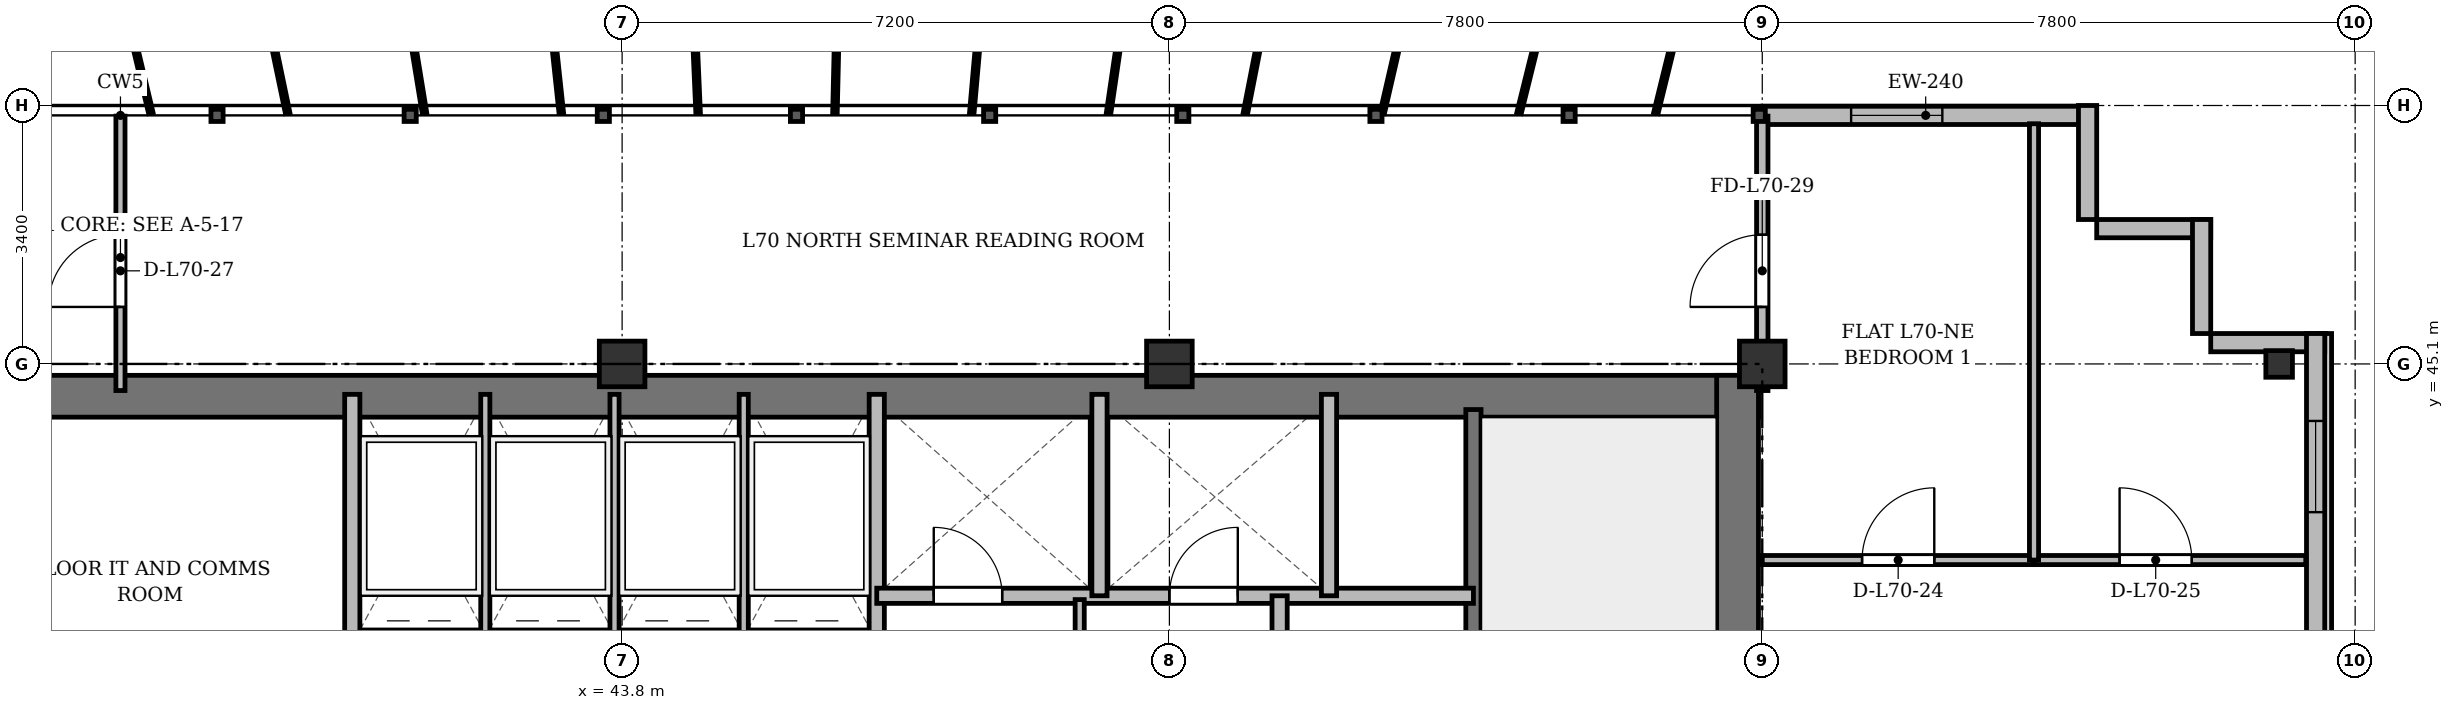
"""IFC4 building model, lengths in metres.
Left out: names, types, materials, properties, quantities, classifications, styles, units other than length and angle.
Written with IfcOpenShell. Run it as: python <this file> out.ifc"""

import sys

from ifc_helpers import new_model, si_unit, direction, frame, frame_2d, origin, origin_2d, place, context, subcontext, project, spatial, rectangle, i_section, extrude, source, transform, mapped, element, fill, save


model = new_model("IFC4")
c1 = context("Model", 3, precision=1e-05, world=origin(), true_north=direction((0.0, 1.0)))
c2 = subcontext(c1, "Body", "Model", "MODEL_VIEW")
j1 = project(units=[si_unit("LENGTHUNIT", "METRE"), si_unit("PLANEANGLEUNIT", "RADIAN")], contexts=[c1])
p1 = place(None, origin())
s1 = spatial("IfcSite", under=j1, at=p1, CompositionType="ELEMENT")
p2 = place(p1, origin())
s2 = spatial("IfcBuilding", under=s1, at=p2, CompositionType="ELEMENT")
p3 = place(p2, frame((0.0, 0.0, 270.3)))
s3 = spatial("IfcBuildingStorey", under=s2, at=p3, CompositionType="ELEMENT", Elevation=270.3)
m1 = source(origin(), c2, "Body", "SweptSolid", [
    extrude(rectangle(XDim=0.6, YDim=0.6, at=origin_2d()), origin(), (0.0, 0.0, 1.0), 3.6),
])
for number, where, z_axis, x_axis in (
    (1, (43.8, 45.1, 0.0), (0.0, 0.0, 1.0), (1.0, 0.0, 0.0)),
    (2, (51.0, 45.1, 0.0), (0.0, 0.0, 1.0), (1.0, 0.0, 0.0)),
    (3, (58.8, 45.1, 0.0), (0.0, 0.0, 1.0), (1.0, 0.0, 0.0)),
):
    element("IfcColumn", number, at=place(p3, frame(where, z_axis=z_axis, x_axis=x_axis)), inside=s3, PredefinedType="COLUMN", context=c2, shape_type="MappedRepresentation", body=[
        mapped(m1, transform((0.0, 0.0, 0.0), x_axis=(1.0, 0.0, 0.0), y_axis=(0.0, 1.0, 0.0), z_axis=(0.0, 0.0, 1.0), scale=1.0)),
    ])
m2 = source(origin(), c2, "Body", "SweptSolid", [
    extrude(i_section(OverallWidth=0.35, OverallDepth=0.35, WebThickness=0.018, FlangeThickness=0.028, at=origin_2d()), origin(), (0.0, 0.0, 1.0), 3.6),
])
p4 = place(p3, frame((65.6, 45.1, 0.0), z_axis=(0.0, 0.0, 1.0), x_axis=(1.0, 0.0, 0.0)))
e4 = element("IfcColumn", 4, at=p4, inside=s3, PredefinedType="COLUMN", context=c2, shape_type="MappedRepresentation", body=[
    mapped(m2, transform((0.0, 0.0, 0.0), x_axis=(1.0, 0.0, 0.0), y_axis=(0.0, 1.0, 0.0), z_axis=(0.0, 0.0, 1.0), scale=1.0)),
])
p5 = place(p3, frame((58.8, 48.37, 0.0), z_axis=(0.0, 0.0, 1.0), x_axis=(1.0, 0.0, 0.0)))
e5 = element("IfcWall", 5, at=p5, inside=s3, PredefinedType="SOLIDWALL", context=c2, shape_type="SweptSolid", body=[
    extrude(rectangle(XDim=4.3, YDim=0.24, at=frame_2d((2.15, 0.0))), origin(), (0.0, 0.0, 1.0), 3.37),
])
p6 = place(p5, frame((1.169, 0.0, 0.9)))
e6 = element("IfcOpeningElement", 6, at=p6, cuts=e5, PredefinedType="OPENING", context=c2, shape_type="SweptSolid", body=[
    extrude(rectangle(XDim=1.2, YDim=1.65, at=frame_2d((0.6, 0.825))), frame((0.0, 0.13, 0.0), z_axis=(0.0, -1.0, 0.0), x_axis=(1.0, 0.0, 0.0)), (0.0, 0.0, 1.0), 0.26),
])
for number, where, z_axis, x_axis in (
    (7, (63.08, 48.5, 0.0), (0.0, 0.0, 1.0), (0.0, -1.0, 0.0)),
    (8, (63.2, 46.88, 0.0), (0.0, 0.0, 1.0), (1.0, 0.0, 0.0)),
    (9, (64.58, 47.0, 0.0), (0.0, 0.0, 1.0), (0.0, -1.0, 0.0)),
    (10, (64.7, 45.38, 0.0), (0.0, 0.0, 1.0), (1.0, 0.0, 0.0)),
):
    element("IfcWall", number, at=place(p3, frame(where, z_axis=z_axis, x_axis=x_axis)), inside=s3, PredefinedType="SOLIDWALL", context=c2, shape_type="SweptSolid", body=[
        extrude(rectangle(XDim=1.5, YDim=0.24, at=frame_2d((0.75, 0.0))), origin(), (0.0, 0.0, 1.0), 3.37),
    ])
p7 = place(p3, frame((66.08, 45.5, 0.0), z_axis=(0.0, 0.0, 1.0), x_axis=(0.0, -1.0, 0.0)))
e11 = element("IfcWall", 11, at=p7, inside=s3, PredefinedType="SOLIDWALL", context=c2, shape_type="SweptSolid", body=[
    extrude(rectangle(XDim=39.0, YDim=0.24, at=frame_2d((19.5, 0.0))), origin(), (0.0, 0.0, 1.0), 3.37),
])
p8 = place(p7, frame((36.35, 0.0, 0.92)))
e12 = element("IfcOpeningElement", 12, at=p8, cuts=e11, PredefinedType="OPENING", context=c2, shape_type="SweptSolid", body=[
    extrude(rectangle(XDim=1.2, YDim=1.65, at=frame_2d((0.6, 0.825))), frame((0.0, 0.13, 0.0), z_axis=(0.0, -1.0, 0.0), x_axis=(1.0, 0.0, 0.0)), (0.0, 0.0, 1.0), 0.26),
])
p9 = place(p7, frame((32.8, 0.0, 0.92)))
e13 = element("IfcOpeningElement", 13, at=p9, cuts=e11, PredefinedType="OPENING", context=c2, shape_type="SweptSolid", body=[
    extrude(rectangle(XDim=2.6, YDim=1.9, at=frame_2d((1.3, 0.95))), frame((0.0, 0.13, 0.0), z_axis=(0.0, -1.0, 0.0), x_axis=(1.0, 0.0, 0.0)), (0.0, 0.0, 1.0), 0.26),
])
p10 = place(p7, frame((28.6, 0.0, 0.92)))
e14 = element("IfcOpeningElement", 14, at=p10, cuts=e11, PredefinedType="OPENING", context=c2, shape_type="SweptSolid", body=[
    extrude(rectangle(XDim=2.6, YDim=1.9, at=frame_2d((1.3, 0.95))), frame((0.0, 0.13, 0.0), z_axis=(0.0, -1.0, 0.0), x_axis=(1.0, 0.0, 0.0)), (0.0, 0.0, 1.0), 0.26),
])
p11 = place(p7, frame((21.4, 0.0, 0.92)))
e15 = element("IfcOpeningElement", 15, at=p11, cuts=e11, PredefinedType="OPENING", context=c2, shape_type="SweptSolid", body=[
    extrude(rectangle(XDim=2.6, YDim=1.9, at=frame_2d((1.3, 0.95))), frame((0.0, 0.13, 0.0), z_axis=(0.0, -1.0, 0.0), x_axis=(1.0, 0.0, 0.0)), (0.0, 0.0, 1.0), 0.26),
])
p12 = place(p7, frame((7.4, 0.0, 0.92)))
e16 = element("IfcOpeningElement", 16, at=p12, cuts=e11, PredefinedType="OPENING", context=c2, shape_type="SweptSolid", body=[
    extrude(rectangle(XDim=2.6, YDim=1.9, at=frame_2d((1.3, 0.95))), frame((0.0, 0.13, 0.0), z_axis=(0.0, -1.0, 0.0), x_axis=(1.0, 0.0, 0.0)), (0.0, 0.0, 1.0), 0.26),
])
p13 = place(p7, frame((4.5, 0.0, 0.92)))
e17 = element("IfcOpeningElement", 17, at=p13, cuts=e11, PredefinedType="OPENING", context=c2, shape_type="SweptSolid", body=[
    extrude(rectangle(XDim=1.2, YDim=1.65, at=frame_2d((0.6, 0.825))), frame((0.0, 0.13, 0.0), z_axis=(0.0, -1.0, 0.0), x_axis=(1.0, 0.0, 0.0)), (0.0, 0.0, 1.0), 0.26),
])
p14 = place(p7, frame((1.15, 0.0, 0.92)))
e18 = element("IfcOpeningElement", 18, at=p14, cuts=e11, PredefinedType="OPENING", context=c2, shape_type="SweptSolid", body=[
    extrude(rectangle(XDim=1.2, YDim=1.65, at=frame_2d((0.6, 0.825))), frame((0.0, 0.13, 0.0), z_axis=(0.0, -1.0, 0.0), x_axis=(1.0, 0.0, 0.0)), (0.0, 0.0, 1.0), 0.26),
])
p15 = place(p3, frame((15.65, 44.675, 0.0), z_axis=(0.0, 0.0, 1.0), x_axis=(1.0, 0.0, 0.0)))
e19 = element("IfcWall", 19, at=p15, inside=s3, PredefinedType="SHEAR", context=c2, shape_type="SweptSolid", body=[
    extrude(rectangle(XDim=43.1, YDim=0.55, at=frame_2d((21.55, 0.0))), origin(), (0.0, 0.0, 1.0), 3.37),
])
p16 = place(p3, frame((58.475, 33.4, 0.0), z_axis=(0.0, 0.0, 1.0), x_axis=(0.0, 1.0, 0.0)))
e20 = element("IfcWall", 20, at=p16, inside=s3, PredefinedType="SHEAR", context=c2, shape_type="SweptSolid", body=[
    extrude(rectangle(XDim=11.55, YDim=0.55, at=frame_2d((5.775, 0.0))), origin(), (0.0, 0.0, 1.0), 3.37),
])
p17 = place(p3, frame((55.0, 33.4, 0.0), z_axis=(0.0, 0.0, 1.0), x_axis=(0.0, 1.0, 0.0)))
e21 = element("IfcWall", 21, at=p17, inside=s3, PredefinedType="SHEAR", context=c2, shape_type="SweptSolid", body=[
    extrude(rectangle(XDim=11.1, YDim=0.2, at=frame_2d((5.55, 0.0))), origin(), (0.0, 0.0, 1.0), 3.37),
])
p18 = place(p17, frame((0.85, 0.0, 0.0)))
e22 = element("IfcOpeningElement", 22, at=p18, cuts=e21, PredefinedType="OPENING", context=c2, shape_type="SweptSolid", body=[
    extrude(rectangle(XDim=1.1, YDim=2.15, at=frame_2d((0.55, 1.075))), frame((0.0, 0.11, 0.0), z_axis=(0.0, -1.0, 0.0), x_axis=(1.0, 0.0, 0.0)), (0.0, 0.0, 1.0), 0.22),
])
p19 = place(p3, frame((40.25, 41.5, 0.0), z_axis=(0.0, 0.0, 1.0), x_axis=(0.0, 1.0, 0.0)))
e23 = element("IfcWall", 23, at=p19, inside=s3, PredefinedType="SOLIDWALL", context=c2, shape_type="SweptSolid", body=[
    extrude(rectangle(XDim=3.2, YDim=0.2, at=frame_2d((1.6, 0.0))), origin(), (0.0, 0.0, 1.0), 3.37),
])
for number, where, z_axis, x_axis in (
    (24, (42.0, 41.5, 0.0), (0.0, 0.0, 1.0), (0.0, 1.0, 0.0)),
    (25, (43.7, 41.5, 0.0), (0.0, 0.0, 1.0), (0.0, 1.0, 0.0)),
    (26, (45.4, 41.5, 0.0), (0.0, 0.0, 1.0), (0.0, 1.0, 0.0)),
):
    element("IfcWall", number, at=place(p3, frame(where, z_axis=z_axis, x_axis=x_axis)), inside=s3, PredefinedType="PARTITIONING", context=c2, shape_type="SweptSolid", body=[
        extrude(rectangle(XDim=3.2, YDim=0.12, at=frame_2d((1.6, 0.0))), origin(), (0.0, 0.0, 1.0), 3.37),
    ])
p20 = place(p3, frame((47.15, 33.4, 0.0), z_axis=(0.0, 0.0, 1.0), x_axis=(0.0, 1.0, 0.0)))
e27 = element("IfcWall", 27, at=p20, inside=s3, PredefinedType="SOLIDWALL", context=c2, shape_type="SweptSolid", body=[
    extrude(rectangle(XDim=11.3, YDim=0.2, at=frame_2d((5.65, 0.0))), origin(), (0.0, 0.0, 1.0), 2.92),
])
p21 = place(p3, frame((47.15, 42.05, 0.0), z_axis=(0.0, 0.0, 1.0), x_axis=(1.0, 0.0, 0.0)))
e28 = element("IfcWall", 28, at=p21, inside=s3, PredefinedType="SOLIDWALL", context=c2, shape_type="SweptSolid", body=[
    extrude(rectangle(XDim=7.85, YDim=0.2, at=frame_2d((3.925, 0.0))), origin(), (0.0, 0.0, 1.0), 2.87),
])
p22 = place(p21, frame((0.75, 0.0, 0.0)))
e29 = element("IfcOpeningElement", 29, at=p22, cuts=e28, PredefinedType="OPENING", context=c2, shape_type="SweptSolid", body=[
    extrude(rectangle(XDim=0.9, YDim=2.1, at=frame_2d((0.45, 1.05))), frame((0.0, 0.11, 0.0), z_axis=(0.0, -1.0, 0.0), x_axis=(1.0, 0.0, 0.0)), (0.0, 0.0, 1.0), 0.22),
])
p23 = place(p21, frame((3.85, 0.0, 0.0)))
e30 = element("IfcOpeningElement", 30, at=p23, cuts=e28, PredefinedType="OPENING", context=c2, shape_type="SweptSolid", body=[
    extrude(rectangle(XDim=0.9, YDim=2.1, at=frame_2d((0.45, 1.05))), frame((0.0, 0.11, 0.0), z_axis=(0.0, -1.0, 0.0), x_axis=(1.0, 0.0, 0.0)), (0.0, 0.0, 1.0), 0.22),
])
for number, where, z_axis, x_axis in (
    (31, (50.08, 42.05, 0.0), (0.0, 0.0, 1.0), (0.0, 1.0, 0.0)),
    (32, (53.1, 42.05, 0.0), (0.0, 0.0, 1.0), (0.0, 1.0, 0.0)),
):
    element("IfcWall", number, at=place(p3, frame(where, z_axis=z_axis, x_axis=x_axis)), inside=s3, PredefinedType="SOLIDWALL", context=c2, shape_type="SweptSolid", body=[
        extrude(rectangle(XDim=2.65, YDim=0.2, at=frame_2d((1.325, 0.0))), origin(), (0.0, 0.0, 1.0), 3.37),
    ])
p24 = place(p3, frame((52.45, 33.4, 0.0), z_axis=(0.0, 0.0, 1.0), x_axis=(0.0, 1.0, 0.0)))
e33 = element("IfcWall", 33, at=p24, inside=s3, PredefinedType="PARTITIONING", context=c2, shape_type="SweptSolid", body=[
    extrude(rectangle(XDim=8.65, YDim=0.2, at=frame_2d((4.325, 0.0))), origin(), (0.0, 0.0, 1.0), 2.92),
])
p25 = place(p24, frame((6.2, 0.0, 0.0)))
e34 = element("IfcOpeningElement", 34, at=p25, cuts=e33, PredefinedType="OPENING", context=c2, shape_type="SweptSolid", body=[
    extrude(rectangle(XDim=0.95, YDim=2.15, at=frame_2d((0.475, 1.075))), frame((0.0, 0.11, 0.0), z_axis=(0.0, -1.0, 0.0), x_axis=(1.0, 0.0, 0.0)), (0.0, 0.0, 1.0), 0.22),
])
p26 = place(p3, frame((49.82, 36.18, 0.0), z_axis=(0.0, 0.0, 1.0), x_axis=(0.0, 1.0, 0.0)))
e35 = element("IfcWall", 35, at=p26, inside=s3, PredefinedType="PARTITIONING", context=c2, shape_type="SweptSolid", body=[
    extrude(rectangle(XDim=5.82, YDim=0.12, at=frame_2d((2.91, 0.0))), origin(), (0.0, 0.0, 1.0), 3.37),
])
p27 = place(p3, frame((58.8, 42.52, 0.0), z_axis=(0.0, 0.0, 1.0), x_axis=(1.0, 0.0, 0.0)))
e36 = element("IfcWall", 36, at=p27, inside=s3, PredefinedType="PARTITIONING", context=c2, shape_type="SweptSolid", body=[
    extrude(rectangle(XDim=3.575, YDim=0.12, at=frame_2d((1.788, 0.0))), origin(), (0.0, 0.0, 1.0), 2.87),
])
p28 = place(p27, frame((1.313, 0.0, 0.0)))
e37 = element("IfcOpeningElement", 37, at=p28, cuts=e36, PredefinedType="OPENING", context=c2, shape_type="SweptSolid", body=[
    extrude(rectangle(XDim=0.95, YDim=2.15, at=frame_2d((0.475, 1.075))), frame((0.0, 0.07, 0.0), z_axis=(0.0, -1.0, 0.0), x_axis=(1.0, 0.0, 0.0)), (0.0, 0.0, 1.0), 0.14),
])
p29 = place(p3, frame((62.375, 42.52, 0.0), z_axis=(0.0, 0.0, 1.0), x_axis=(1.0, 0.0, 0.0)))
e38 = element("IfcWall", 38, at=p29, inside=s3, PredefinedType="PARTITIONING", context=c2, shape_type="SweptSolid", body=[
    extrude(rectangle(XDim=3.575, YDim=0.12, at=frame_2d((1.788, 0.0))), origin(), (0.0, 0.0, 1.0), 2.87),
])
p30 = place(p29, frame((1.126, 0.0, 0.0)))
e39 = element("IfcOpeningElement", 39, at=p30, cuts=e38, PredefinedType="OPENING", context=c2, shape_type="SweptSolid", body=[
    extrude(rectangle(XDim=0.95, YDim=2.15, at=frame_2d((0.475, 1.075))), frame((0.0, 0.07, 0.0), z_axis=(0.0, -1.0, 0.0), x_axis=(1.0, 0.0, 0.0)), (0.0, 0.0, 1.0), 0.14),
])
p31 = place(p3, frame((62.375, 42.52, 0.0), z_axis=(0.0, 0.0, 1.0), x_axis=(0.0, 1.0, 0.0)))
e40 = element("IfcWall", 40, at=p31, inside=s3, PredefinedType="PARTITIONING", context=c2, shape_type="SweptSolid", body=[
    extrude(rectangle(XDim=5.74, YDim=0.12, at=frame_2d((2.87, 0.0))), origin(), (0.0, 0.0, 1.0), 2.92),
])
p32 = place(p3, frame((37.2, 44.75, 0.0), z_axis=(0.0, 0.0, 1.0), x_axis=(0.0, 1.0, 0.0)))
e41 = element("IfcWall", 41, at=p32, inside=s3, PredefinedType="PARTITIONING", context=c2, shape_type="SweptSolid", body=[
    extrude(rectangle(XDim=3.61, YDim=0.12, at=frame_2d((1.805, 0.0))), origin(), (0.0, 0.0, 1.0), 2.92),
])
p33 = place(p32, frame((1.1, 0.0, 0.0)))
e42 = element("IfcOpeningElement", 42, at=p33, cuts=e41, PredefinedType="OPENING", context=c2, shape_type="SweptSolid", body=[
    extrude(rectangle(XDim=0.95, YDim=2.15, at=frame_2d((0.475, 1.075))), frame((0.0, 0.07, 0.0), z_axis=(0.0, -1.0, 0.0), x_axis=(1.0, 0.0, 0.0)), (0.0, 0.0, 1.0), 0.14),
])
p34 = place(p3, frame((58.8, 44.75, 0.0), z_axis=(0.0, 0.0, 1.0), x_axis=(0.0, 1.0, 0.0)))
e43 = element("IfcWall", 43, at=p34, inside=s3, PredefinedType="PARTITIONING", context=c2, shape_type="SweptSolid", body=[
    extrude(rectangle(XDim=3.61, YDim=0.15, at=frame_2d((1.805, 0.0))), origin(), (0.0, 0.0, 1.0), 2.87),
])
p35 = place(p34, frame((1.1, 0.0, 0.0)))
e44 = element("IfcOpeningElement", 44, at=p35, cuts=e43, PredefinedType="OPENING", context=c2, shape_type="SweptSolid", body=[
    extrude(rectangle(XDim=0.95, YDim=2.15, at=frame_2d((0.475, 1.075))), frame((0.0, 0.085, 0.0), z_axis=(0.0, -1.0, 0.0), x_axis=(1.0, 0.0, 0.0)), (0.0, 0.0, 1.0), 0.17),
])
m3 = source(origin(), c2, "Body", "SweptSolid", [
    extrude(rectangle(XDim=1.2, YDim=1.65, at=frame_2d((0.6, 0.825))), frame((0.0, 0.03, 0.0), z_axis=(0.0, -1.0, 0.0), x_axis=(1.0, 0.0, 0.0)), (0.0, 0.0, 1.0), 0.06),
])
p36 = place(p6, origin())
e45 = element("IfcWindow", 45, at=p36, inside=s3, PartitioningType="SINGLE_PANEL", PredefinedType="WINDOW", context=c2, shape_type="MappedRepresentation", body=[
    mapped(m3, transform((0.0, 0.0, 0.0), x_axis=(1.0, 0.0, 0.0), y_axis=(0.0, 1.0, 0.0), z_axis=(0.0, 0.0, 1.0), scale=1.0)),
])
fill(e6, e45)
p37 = place(p14, origin())
e46 = element("IfcWindow", 46, at=p37, inside=s3, PartitioningType="SINGLE_PANEL", PredefinedType="WINDOW", context=c2, shape_type="MappedRepresentation", body=[
    mapped(m3, transform((0.0, 0.0, 0.0), x_axis=(1.0, 0.0, 0.0), y_axis=(0.0, 1.0, 0.0), z_axis=(0.0, 0.0, 1.0), scale=1.0)),
])
fill(e18, e46)
m4 = source(origin(), c2, "Body", "SweptSolid", [
    extrude(rectangle(XDim=0.9, YDim=2.1, at=frame_2d((0.45, 1.05))), frame((0.0, 0.025, 0.0), z_axis=(0.0, -1.0, 0.0), x_axis=(1.0, 0.0, 0.0)), (0.0, 0.0, 1.0), 0.05),
])
p38 = place(p22, origin())
e47 = element("IfcDoor", 47, at=p38, inside=s3, OperationType="SINGLE_SWING_LEFT", PredefinedType="DOOR", context=c2, shape_type="MappedRepresentation", body=[
    mapped(m4, transform((0.0, 0.0, 0.0), x_axis=(1.0, 0.0, 0.0), y_axis=(0.0, 1.0, 0.0), z_axis=(0.0, 0.0, 1.0), scale=1.0)),
])
fill(e29, e47)
p39 = place(p23, origin())
e48 = element("IfcDoor", 48, at=p39, inside=s3, OperationType="SINGLE_SWING_RIGHT", PredefinedType="DOOR", context=c2, shape_type="MappedRepresentation", body=[
    mapped(m4, transform((0.0, 0.0, 0.0), x_axis=(1.0, 0.0, 0.0), y_axis=(0.0, 1.0, 0.0), z_axis=(0.0, 0.0, 1.0), scale=1.0)),
])
fill(e30, e48)
m5 = source(origin(), c2, "Body", "SweptSolid", [
    extrude(rectangle(XDim=0.95, YDim=2.15, at=frame_2d((0.475, 1.075))), frame((0.0, 0.025, 0.0), z_axis=(0.0, -1.0, 0.0), x_axis=(1.0, 0.0, 0.0)), (0.0, 0.0, 1.0), 0.05),
])
p40 = place(p28, origin())
e49 = element("IfcDoor", 49, at=p40, inside=s3, OperationType="SINGLE_SWING_RIGHT", PredefinedType="DOOR", context=c2, shape_type="MappedRepresentation", body=[
    mapped(m5, transform((0.0, 0.0, 0.0), x_axis=(1.0, 0.0, 0.0), y_axis=(0.0, 1.0, 0.0), z_axis=(0.0, 0.0, 1.0), scale=1.0)),
])
fill(e37, e49)
p41 = place(p30, origin())
e50 = element("IfcDoor", 50, at=p41, inside=s3, OperationType="SINGLE_SWING_LEFT", PredefinedType="DOOR", context=c2, shape_type="MappedRepresentation", body=[
    mapped(m5, transform((0.0, 0.0, 0.0), x_axis=(1.0, 0.0, 0.0), y_axis=(0.0, 1.0, 0.0), z_axis=(0.0, 0.0, 1.0), scale=1.0)),
])
fill(e39, e50)
p42 = place(p33, origin())
e51 = element("IfcDoor", 51, at=p42, inside=s3, OperationType="SINGLE_SWING_LEFT", PredefinedType="DOOR", context=c2, shape_type="MappedRepresentation", body=[
    mapped(m5, transform((0.0, 0.0, 0.0), x_axis=(1.0, 0.0, 0.0), y_axis=(0.0, 1.0, 0.0), z_axis=(0.0, 0.0, 1.0), scale=1.0)),
])
fill(e42, e51)
p43 = place(p35, origin())
e52 = element("IfcDoor", 52, at=p43, inside=s3, OperationType="SINGLE_SWING_LEFT", PredefinedType="DOOR", context=c2, shape_type="MappedRepresentation", body=[
    mapped(m5, transform((0.0, 0.0, 0.0), x_axis=(1.0, 0.0, 0.0), y_axis=(0.0, 1.0, 0.0), z_axis=(0.0, 0.0, 1.0), scale=1.0)),
])
fill(e44, e52)
save(model, sys.argv[1])
